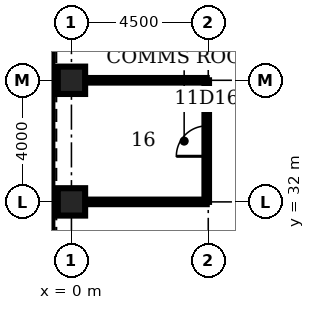
"""IFC4 building model, lengths in metres.
Left out: names, types, materials, properties, quantities, classifications, styles, units other than length and angle.
Written with IfcOpenShell. Run it as: python <this file> out.ifc"""

import sys

from ifc_helpers import new_model, si_unit, direction, frame, frame_2d, origin, origin_2d, place, context, subcontext, project, spatial, rectangle, hollow_rectangle, extrude, element, fill, save


model = new_model("IFC4")
c1 = context("Model", 3, precision=1e-05, world=origin(), true_north=direction((0.0, 1.0)))
c2 = subcontext(c1, "Body", "Model", "MODEL_VIEW")
j1 = project(units=[si_unit("LENGTHUNIT", "METRE"), si_unit("PLANEANGLEUNIT", "RADIAN")], contexts=[c1])
p1 = place(None, origin())
s1 = spatial("IfcSite", under=j1, at=p1, CompositionType="ELEMENT")
p2 = place(p1, origin())
s2 = spatial("IfcBuilding", under=s1, at=p2, CompositionType="ELEMENT")
p3 = place(p2, frame((0.0, 0.0, 54.5)))
s3 = spatial("IfcBuildingStorey", under=s2, at=p3, CompositionType="ELEMENT", Elevation=54.5)
for number, where, z_axis, x_axis in (
    (1, (0.0, 36.0, 0.0), (0.0, 0.0, 1.0), (1.0, 0.0, 0.0)),
    (2, (0.0, 32.0, 0.0), (0.0, 0.0, 1.0), (1.0, 0.0, 0.0)),
):
    element("IfcColumn", number, at=place(p3, frame(where, z_axis=z_axis, x_axis=x_axis)), inside=s3, PredefinedType="COLUMN", context=c2, shape_type="SweptSolid", body=[
        extrude(hollow_rectangle(XDim=0.9, YDim=0.9, WallThickness=0.12, at=origin_2d()), origin(), (0.0, 0.0, 1.0), 4.5),
    ])
for number, where, z_axis, x_axis in (
    (3, (0.45, 32.0, 0.0), (0.0, 0.0, 1.0), (1.0, 0.0, 0.0)),
    (4, (0.45, 36.0, 0.0), (0.0, 0.0, 1.0), (1.0, 0.0, 0.0)),
):
    element("IfcWall", number, at=place(p3, frame(where, z_axis=z_axis, x_axis=x_axis)), inside=s3, PredefinedType="PARTITIONING", context=c2, shape_type="SweptSolid", body=[
        extrude(rectangle(XDim=4.0, YDim=0.15, at=frame_2d((2.0, 0.0))), origin(), (0.0, 0.0, 1.0), 3.0),
    ])
p4 = place(p3, frame((4.45, 32.0, 0.0), z_axis=(0.0, 0.0, 1.0), x_axis=(0.0, 1.0, 0.0)))
e5 = element("IfcWall", 5, at=p4, inside=s3, PredefinedType="PARTITIONING", context=c2, shape_type="SweptSolid", body=[
    extrude(rectangle(XDim=4.0, YDim=0.15, at=frame_2d((2.0, 0.0))), origin(), (0.0, 0.0, 1.0), 3.0),
])
p5 = place(p4, frame((1.5, 0.0, 0.0)))
e6 = element("IfcOpeningElement", 6, at=p5, cuts=e5, PredefinedType="OPENING", context=c2, shape_type="SweptSolid", body=[
    extrude(rectangle(XDim=1.0, YDim=2.1, at=frame_2d((0.5, 1.05))), frame((0.0, 0.085, 0.0), z_axis=(0.0, -1.0, 0.0), x_axis=(1.0, 0.0, 0.0)), (0.0, 0.0, 1.0), 0.17),
])
p6 = place(p5, origin())
e7 = element("IfcDoor", 7, at=p6, inside=s3, OperationType="SINGLE_SWING_LEFT", PredefinedType="DOOR", context=c2, shape_type="SweptSolid", body=[
    extrude(rectangle(XDim=1.0, YDim=2.1, at=frame_2d((0.5, 1.05))), frame((0.0, 0.025, 0.0), z_axis=(0.0, -1.0, 0.0), x_axis=(1.0, 0.0, 0.0)), (0.0, 0.0, 1.0), 0.05),
])
fill(e6, e7)
save(model, sys.argv[1])
